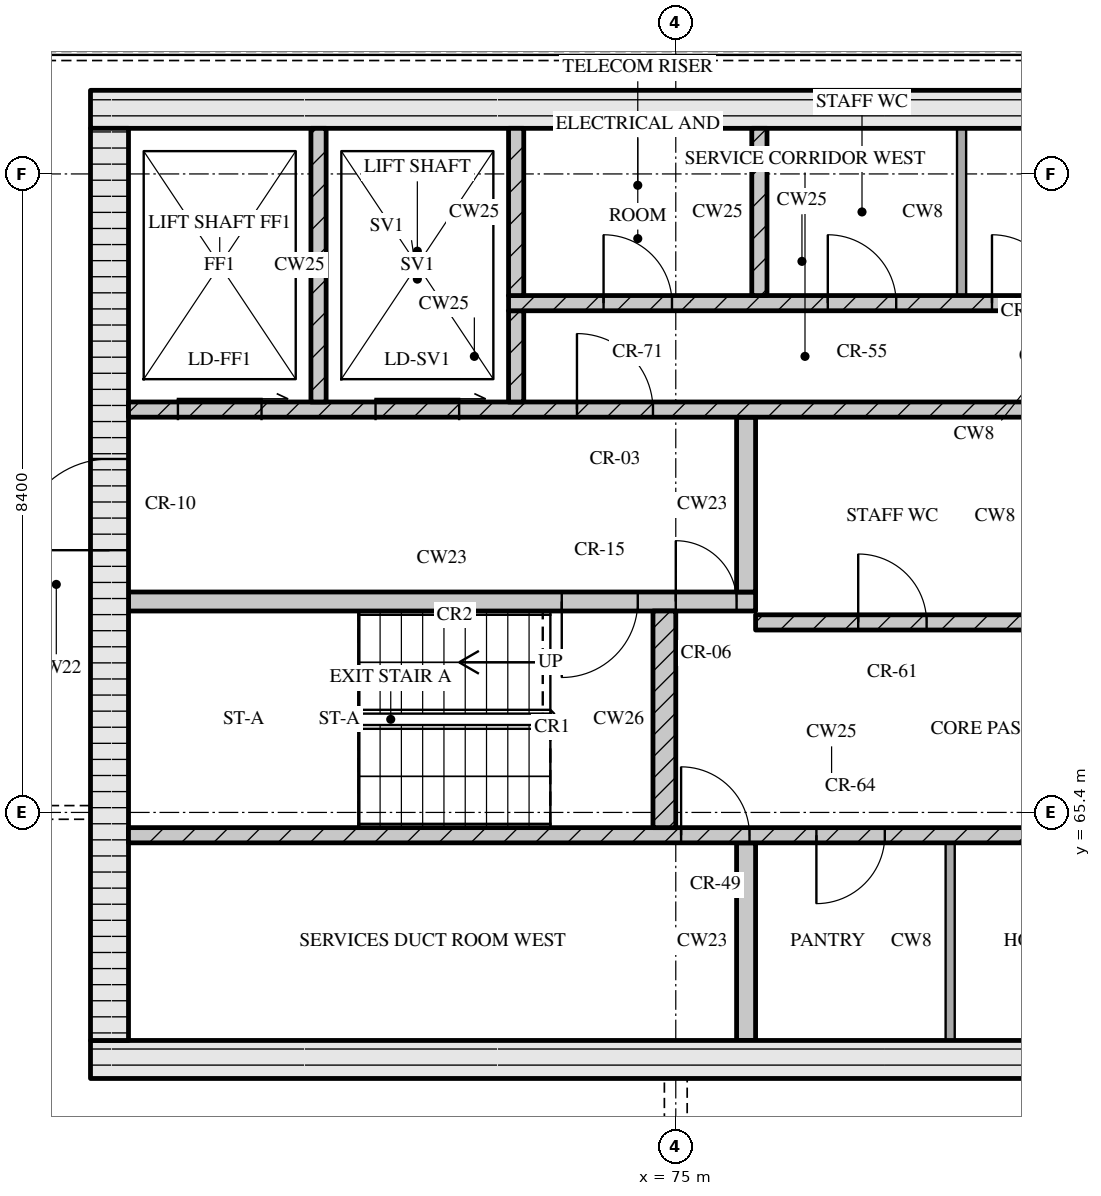
"""IFC4 building model, lengths in metres.
Left out: names, types, materials, properties, quantities, classifications, styles, units other than length and angle.
Written with IfcOpenShell. Run it as: python <this file> out.ifc"""

import sys

from ifc_helpers import new_model, si_unit, direction, frame, frame_2d, origin, place, context, subcontext, project, spatial, rectangle, extrude, element, fill, save


model = new_model("IFC4")
c1 = context("Model", 3, precision=1e-05, world=origin(), true_north=direction((0.0, 1.0)))
c2 = subcontext(c1, "Body", "Model", "MODEL_VIEW")
j1 = project(units=[si_unit("LENGTHUNIT", "METRE"), si_unit("PLANEANGLEUNIT", "RADIAN")], contexts=[c1])
p1 = place(None, origin())
s1 = spatial("IfcSite", under=j1, at=p1, CompositionType="ELEMENT")
p2 = place(p1, origin())
s2 = spatial("IfcBuilding", under=s1, at=p2, CompositionType="ELEMENT")
p3 = place(p2, frame((0.0, 0.0, 277.95)))
s3 = spatial("IfcBuildingStorey", under=s2, at=p3, CompositionType="ELEMENT", Elevation=277.95)
p4 = place(p3, frame((67.3, 62.15, 0.0), z_axis=(0.0, 0.0, 1.0), x_axis=(1.0, 0.0, 0.0)))
e1 = element("IfcWall", 1, at=p4, inside=s3, PredefinedType="SOLIDWALL", context=c2, shape_type="SweptSolid", body=[
    extrude(rectangle(XDim=40.6, YDim=0.5, at=frame_2d((20.3, 0.0))), origin(), (0.0, 0.0, 1.0), 3.32),
])
p5 = place(p4, frame((20.65, 0.0, 0.0)))
e2 = element("IfcOpeningElement", 2, at=p5, cuts=e1, PredefinedType="OPENING", context=c2, shape_type="SweptSolid", body=[
    extrude(rectangle(XDim=1.8, YDim=2.1, at=frame_2d((0.9, 1.05))), frame((0.0, 0.26, 0.0), z_axis=(0.0, -1.0, 0.0), x_axis=(1.0, 0.0, 0.0)), (0.0, 0.0, 1.0), 0.52),
])
p6 = place(p3, frame((67.3, 74.65, 0.0), z_axis=(0.0, 0.0, 1.0), x_axis=(1.0, 0.0, 0.0)))
e3 = element("IfcWall", 3, at=p6, inside=s3, PredefinedType="SOLIDWALL", context=c2, shape_type="SweptSolid", body=[
    extrude(rectangle(XDim=40.6, YDim=0.5, at=frame_2d((20.3, 0.0))), origin(), (0.0, 0.0, 1.0), 3.32),
])
p7 = place(p3, frame((67.55, 62.4, 0.0), z_axis=(0.0, 0.0, 1.0), x_axis=(0.0, 1.0, 0.0)))
e4 = element("IfcWall", 4, at=p7, inside=s3, PredefinedType="SOLIDWALL", context=c2, shape_type="SweptSolid", body=[
    extrude(rectangle(XDim=12.0, YDim=0.5, at=frame_2d((6.0, 0.0))), origin(), (0.0, 0.0, 1.0), 3.32),
])
p8 = place(p7, frame((6.45, 0.0, 0.0)))
e5 = element("IfcOpeningElement", 5, at=p8, cuts=e4, PredefinedType="OPENING", context=c2, shape_type="SweptSolid", body=[
    extrude(rectangle(XDim=1.2, YDim=2.1, at=frame_2d((0.6, 1.05))), frame((0.0, 0.26, 0.0), z_axis=(0.0, -1.0, 0.0), x_axis=(1.0, 0.0, 0.0)), (0.0, 0.0, 1.0), 0.52),
])
p9 = place(p3, frame((75.925, 62.4, 0.0), z_axis=(0.0, 0.0, 1.0), x_axis=(0.0, 1.0, 0.0)))
e6 = element("IfcWall", 6, at=p9, inside=s3, PredefinedType="SOLIDWALL", context=c2, shape_type="SweptSolid", body=[
    extrude(rectangle(XDim=2.6, YDim=0.25, at=frame_2d((1.3, 0.0))), origin(), (0.0, 0.0, 1.0), 3.32),
])
p10 = place(p3, frame((78.61, 62.4, 0.0), z_axis=(0.0, 0.0, 1.0), x_axis=(0.0, 1.0, 0.0)))
e7 = element("IfcWall", 7, at=p10, inside=s3, PredefinedType="PARTITIONING", context=c2, shape_type="SweptSolid", body=[
    extrude(rectangle(XDim=2.6, YDim=0.12, at=frame_2d((1.3, 0.0))), origin(), (0.0, 0.0, 1.0), 3.32),
])
p11 = place(p3, frame((67.8, 65.1, 0.0), z_axis=(0.0, 0.0, 1.0), x_axis=(1.0, 0.0, 0.0)))
e8 = element("IfcWall", 8, at=p11, inside=s3, PredefinedType="SOLIDWALL", context=c2, shape_type="SweptSolid", body=[
    extrude(rectangle(XDim=18.5, YDim=0.2, at=frame_2d((9.25, 0.0))), origin(), (0.0, 0.0, 1.0), 3.32),
])
p12 = place(p11, frame((7.27, 0.0, 0.0)))
e9 = element("IfcOpeningElement", 9, at=p12, cuts=e8, PredefinedType="OPENING", context=c2, shape_type="SweptSolid", body=[
    extrude(rectangle(XDim=0.9, YDim=2.1, at=frame_2d((0.45, 1.05))), frame((0.0, 0.11, 0.0), z_axis=(0.0, -1.0, 0.0), x_axis=(1.0, 0.0, 0.0)), (0.0, 0.0, 1.0), 0.22),
])
p13 = place(p11, frame((9.05, 0.0, 0.0)))
e10 = element("IfcOpeningElement", 10, at=p13, cuts=e8, PredefinedType="OPENING", context=c2, shape_type="SweptSolid", body=[
    extrude(rectangle(XDim=0.9, YDim=2.1, at=frame_2d((0.45, 1.05))), frame((0.0, 0.11, 0.0), z_axis=(0.0, -1.0, 0.0), x_axis=(1.0, 0.0, 0.0)), (0.0, 0.0, 1.0), 0.22),
])
p14 = place(p11, frame((12.76, 0.0, 0.0)))
e11 = element("IfcOpeningElement", 11, at=p14, cuts=e8, PredefinedType="OPENING", context=c2, shape_type="SweptSolid", body=[
    extrude(rectangle(XDim=0.9, YDim=2.1, at=frame_2d((0.45, 1.05))), frame((0.0, 0.11, 0.0), z_axis=(0.0, -1.0, 0.0), x_axis=(1.0, 0.0, 0.0)), (0.0, 0.0, 1.0), 0.22),
])
p15 = place(p11, frame((16.7, 0.0, 0.0)))
e12 = element("IfcOpeningElement", 12, at=p15, cuts=e8, PredefinedType="OPENING", context=c2, shape_type="SweptSolid", body=[
    extrude(rectangle(XDim=0.9, YDim=2.1, at=frame_2d((0.45, 1.05))), frame((0.0, 0.11, 0.0), z_axis=(0.0, -1.0, 0.0), x_axis=(1.0, 0.0, 0.0)), (0.0, 0.0, 1.0), 0.22),
])
p16 = place(p3, frame((74.85, 65.2, 0.0), z_axis=(0.0, 0.0, 1.0), x_axis=(0.0, 1.0, 0.0)))
e13 = element("IfcWall", 13, at=p16, inside=s3, PredefinedType="SOLIDWALL", context=c2, shape_type="SweptSolid", body=[
    extrude(rectangle(XDim=2.85, YDim=0.3, at=frame_2d((1.425, 0.0))), origin(), (0.0, 0.0, 1.0), 3.32),
])
p17 = place(p3, frame((76.05, 67.9, 0.0), z_axis=(0.0, 0.0, 1.0), x_axis=(1.0, 0.0, 0.0)))
e14 = element("IfcWall", 14, at=p17, inside=s3, PredefinedType="SOLIDWALL", context=c2, shape_type="SweptSolid", body=[
    extrude(rectangle(XDim=23.1, YDim=0.2, at=frame_2d((11.55, 0.0))), origin(), (0.0, 0.0, 1.0), 3.32),
])
p18 = place(p17, frame((1.35, 0.0, 0.0)))
e15 = element("IfcOpeningElement", 15, at=p18, cuts=e14, PredefinedType="OPENING", context=c2, shape_type="SweptSolid", body=[
    extrude(rectangle(XDim=0.9, YDim=2.1, at=frame_2d((0.45, 1.05))), frame((0.0, 0.11, 0.0), z_axis=(0.0, -1.0, 0.0), x_axis=(1.0, 0.0, 0.0)), (0.0, 0.0, 1.0), 0.22),
])
p19 = place(p17, frame((5.06, 0.0, 0.0)))
e16 = element("IfcOpeningElement", 16, at=p19, cuts=e14, PredefinedType="OPENING", context=c2, shape_type="SweptSolid", body=[
    extrude(rectangle(XDim=0.9, YDim=2.1, at=frame_2d((0.45, 1.05))), frame((0.0, 0.11, 0.0), z_axis=(0.0, -1.0, 0.0), x_axis=(1.0, 0.0, 0.0)), (0.0, 0.0, 1.0), 0.22),
])
p20 = place(p17, frame((8.45, 0.0, 0.0)))
e17 = element("IfcOpeningElement", 17, at=p20, cuts=e14, PredefinedType="OPENING", context=c2, shape_type="SweptSolid", body=[
    extrude(rectangle(XDim=0.9, YDim=2.1, at=frame_2d((0.45, 1.05))), frame((0.0, 0.11, 0.0), z_axis=(0.0, -1.0, 0.0), x_axis=(1.0, 0.0, 0.0)), (0.0, 0.0, 1.0), 0.22),
])
p21 = place(p17, frame((10.91, 0.0, 0.0)))
e18 = element("IfcOpeningElement", 18, at=p21, cuts=e14, PredefinedType="OPENING", context=c2, shape_type="SweptSolid", body=[
    extrude(rectangle(XDim=0.9, YDim=2.1, at=frame_2d((0.45, 1.05))), frame((0.0, 0.11, 0.0), z_axis=(0.0, -1.0, 0.0), x_axis=(1.0, 0.0, 0.0)), (0.0, 0.0, 1.0), 0.22),
])
p22 = place(p17, frame((13.55, 0.0, 0.0)))
e19 = element("IfcOpeningElement", 19, at=p22, cuts=e14, PredefinedType="OPENING", context=c2, shape_type="SweptSolid", body=[
    extrude(rectangle(XDim=1.0, YDim=2.1, at=frame_2d((0.5, 1.05))), frame((0.0, 0.11, 0.0), z_axis=(0.0, -1.0, 0.0), x_axis=(1.0, 0.0, 0.0)), (0.0, 0.0, 1.0), 0.22),
])
p23 = place(p17, frame((16.2, 0.0, 0.0)))
e20 = element("IfcOpeningElement", 20, at=p23, cuts=e14, PredefinedType="OPENING", context=c2, shape_type="SweptSolid", body=[
    extrude(rectangle(XDim=1.1, YDim=2.1, at=frame_2d((0.55, 1.05))), frame((0.0, 0.11, 0.0), z_axis=(0.0, -1.0, 0.0), x_axis=(1.0, 0.0, 0.0)), (0.0, 0.0, 1.0), 0.22),
])
p24 = place(p17, frame((18.7, 0.0, 0.0)))
e21 = element("IfcOpeningElement", 21, at=p24, cuts=e14, PredefinedType="OPENING", context=c2, shape_type="SweptSolid", body=[
    extrude(rectangle(XDim=1.1, YDim=2.1, at=frame_2d((0.55, 1.05))), frame((0.0, 0.11, 0.0), z_axis=(0.0, -1.0, 0.0), x_axis=(1.0, 0.0, 0.0)), (0.0, 0.0, 1.0), 0.22),
])
p25 = place(p17, frame((21.2, 0.0, 0.0)))
e22 = element("IfcOpeningElement", 22, at=p25, cuts=e14, PredefinedType="OPENING", context=c2, shape_type="SweptSolid", body=[
    extrude(rectangle(XDim=1.1, YDim=2.1, at=frame_2d((0.55, 1.05))), frame((0.0, 0.11, 0.0), z_axis=(0.0, -1.0, 0.0), x_axis=(1.0, 0.0, 0.0)), (0.0, 0.0, 1.0), 0.22),
])
p26 = place(p3, frame((67.8, 68.175, 0.0), z_axis=(0.0, 0.0, 1.0), x_axis=(1.0, 0.0, 0.0)))
e23 = element("IfcWall", 23, at=p26, inside=s3, PredefinedType="SOLIDWALL", context=c2, shape_type="SweptSolid", body=[
    extrude(rectangle(XDim=8.25, YDim=0.25, at=frame_2d((4.125, 0.0))), origin(), (0.0, 0.0, 1.0), 3.32),
])
p27 = place(p26, frame((5.7, 0.0, 0.0)))
e24 = element("IfcOpeningElement", 24, at=p27, cuts=e23, PredefinedType="OPENING", context=c2, shape_type="SweptSolid", body=[
    extrude(rectangle(XDim=1.0, YDim=2.1, at=frame_2d((0.5, 1.05))), frame((0.0, 0.135, 0.0), z_axis=(0.0, -1.0, 0.0), x_axis=(1.0, 0.0, 0.0)), (0.0, 0.0, 1.0), 0.27),
])
p28 = place(p26, frame((7.2, 0.0, 0.0)))
e25 = element("IfcOpeningElement", 25, at=p28, cuts=e23, PredefinedType="OPENING", context=c2, shape_type="SweptSolid", body=[
    extrude(rectangle(XDim=0.8, YDim=2.1, at=frame_2d((0.4, 1.05))), frame((0.0, 0.135, 0.0), z_axis=(0.0, -1.0, 0.0), x_axis=(1.0, 0.0, 0.0)), (0.0, 0.0, 1.0), 0.27),
])
p29 = place(p3, frame((75.925, 68.3, 0.0), z_axis=(0.0, 0.0, 1.0), x_axis=(0.0, 1.0, 0.0)))
e26 = element("IfcWall", 26, at=p29, inside=s3, PredefinedType="SOLIDWALL", context=c2, shape_type="SweptSolid", body=[
    extrude(rectangle(XDim=2.3, YDim=0.25, at=frame_2d((1.15, 0.0))), origin(), (0.0, 0.0, 1.0), 3.32),
])
p30 = place(p3, frame((67.8, 70.7, 0.0), z_axis=(0.0, 0.0, 1.0), x_axis=(1.0, 0.0, 0.0)))
e27 = element("IfcWall", 27, at=p30, inside=s3, PredefinedType="SOLIDWALL", context=c2, shape_type="SweptSolid", body=[
    extrude(rectangle(XDim=39.6, YDim=0.2, at=frame_2d((19.8, 0.0))), origin(), (0.0, 0.0, 1.0), 3.32),
])
p31 = place(p30, frame((0.65, 0.0, 0.0)))
e28 = element("IfcOpeningElement", 28, at=p31, cuts=e27, PredefinedType="OPENING", context=c2, shape_type="SweptSolid", body=[
    extrude(rectangle(XDim=1.1, YDim=2.1, at=frame_2d((0.55, 1.05))), frame((0.0, 0.11, 0.0), z_axis=(0.0, -1.0, 0.0), x_axis=(1.0, 0.0, 0.0)), (0.0, 0.0, 1.0), 0.22),
])
p32 = place(p30, frame((3.25, 0.0, 0.0)))
e29 = element("IfcOpeningElement", 29, at=p32, cuts=e27, PredefinedType="OPENING", context=c2, shape_type="SweptSolid", body=[
    extrude(rectangle(XDim=1.1, YDim=2.1, at=frame_2d((0.55, 1.05))), frame((0.0, 0.11, 0.0), z_axis=(0.0, -1.0, 0.0), x_axis=(1.0, 0.0, 0.0)), (0.0, 0.0, 1.0), 0.22),
])
p33 = place(p30, frame((5.9, 0.0, 0.0)))
e30 = element("IfcOpeningElement", 30, at=p33, cuts=e27, PredefinedType="OPENING", context=c2, shape_type="SweptSolid", body=[
    extrude(rectangle(XDim=1.0, YDim=2.1, at=frame_2d((0.5, 1.05))), frame((0.0, 0.11, 0.0), z_axis=(0.0, -1.0, 0.0), x_axis=(1.0, 0.0, 0.0)), (0.0, 0.0, 1.0), 0.22),
])
p34 = place(p30, frame((21.7, 0.0, 0.0)))
e31 = element("IfcOpeningElement", 31, at=p34, cuts=e27, PredefinedType="OPENING", context=c2, shape_type="SweptSolid", body=[
    extrude(rectangle(XDim=1.0, YDim=2.1, at=frame_2d((0.5, 1.05))), frame((0.0, 0.11, 0.0), z_axis=(0.0, -1.0, 0.0), x_axis=(1.0, 0.0, 0.0)), (0.0, 0.0, 1.0), 0.22),
])
p35 = place(p30, frame((32.7, 0.0, 0.0)))
e32 = element("IfcOpeningElement", 32, at=p35, cuts=e27, PredefinedType="OPENING", context=c2, shape_type="SweptSolid", body=[
    extrude(rectangle(XDim=1.0, YDim=2.1, at=frame_2d((0.5, 1.05))), frame((0.0, 0.11, 0.0), z_axis=(0.0, -1.0, 0.0), x_axis=(1.0, 0.0, 0.0)), (0.0, 0.0, 1.0), 0.22),
])
p36 = place(p30, frame((35.25, 0.0, 0.0)))
e33 = element("IfcOpeningElement", 33, at=p36, cuts=e27, PredefinedType="OPENING", context=c2, shape_type="SweptSolid", body=[
    extrude(rectangle(XDim=1.1, YDim=2.1, at=frame_2d((0.55, 1.05))), frame((0.0, 0.11, 0.0), z_axis=(0.0, -1.0, 0.0), x_axis=(1.0, 0.0, 0.0)), (0.0, 0.0, 1.0), 0.22),
])
p37 = place(p30, frame((37.85, 0.0, 0.0)))
e34 = element("IfcOpeningElement", 34, at=p37, cuts=e27, PredefinedType="OPENING", context=c2, shape_type="SweptSolid", body=[
    extrude(rectangle(XDim=1.1, YDim=2.1, at=frame_2d((0.55, 1.05))), frame((0.0, 0.11, 0.0), z_axis=(0.0, -1.0, 0.0), x_axis=(1.0, 0.0, 0.0)), (0.0, 0.0, 1.0), 0.22),
])
p38 = place(p3, frame((70.3, 70.8, 0.0), z_axis=(0.0, 0.0, 1.0), x_axis=(0.0, 1.0, 0.0)))
e35 = element("IfcWall", 35, at=p38, inside=s3, PredefinedType="SOLIDWALL", context=c2, shape_type="SweptSolid", body=[
    extrude(rectangle(XDim=3.6, YDim=0.2, at=frame_2d((1.8, 0.0))), origin(), (0.0, 0.0, 1.0), 3.32),
])
p39 = place(p3, frame((72.9, 70.8, 0.0), z_axis=(0.0, 0.0, 1.0), x_axis=(0.0, 1.0, 0.0)))
e36 = element("IfcWall", 36, at=p39, inside=s3, PredefinedType="SOLIDWALL", context=c2, shape_type="SweptSolid", body=[
    extrude(rectangle(XDim=1.2, YDim=0.2, at=frame_2d((0.6, 0.0))), origin(), (0.0, 0.0, 1.0), 3.32),
])
p40 = place(p3, frame((72.8, 72.1, 0.0), z_axis=(0.0, 0.0, 1.0), x_axis=(1.0, 0.0, 0.0)))
e37 = element("IfcWall", 37, at=p40, inside=s3, PredefinedType="SOLIDWALL", context=c2, shape_type="SweptSolid", body=[
    extrude(rectangle(XDim=7.72, YDim=0.2, at=frame_2d((3.86, 0.0))), origin(), (0.0, 0.0, 1.0), 3.32),
])
p41 = place(p40, frame((1.25, 0.0, 0.0)))
e38 = element("IfcOpeningElement", 38, at=p41, cuts=e37, PredefinedType="OPENING", context=c2, shape_type="SweptSolid", body=[
    extrude(rectangle(XDim=0.9, YDim=2.1, at=frame_2d((0.45, 1.05))), frame((0.0, 0.11, 0.0), z_axis=(0.0, -1.0, 0.0), x_axis=(1.0, 0.0, 0.0)), (0.0, 0.0, 1.0), 0.22),
])
p42 = place(p40, frame((4.2, 0.0, 0.0)))
e39 = element("IfcOpeningElement", 39, at=p42, cuts=e37, PredefinedType="OPENING", context=c2, shape_type="SweptSolid", body=[
    extrude(rectangle(XDim=0.9, YDim=2.1, at=frame_2d((0.45, 1.05))), frame((0.0, 0.11, 0.0), z_axis=(0.0, -1.0, 0.0), x_axis=(1.0, 0.0, 0.0)), (0.0, 0.0, 1.0), 0.22),
])
p43 = place(p40, frame((6.36, 0.0, 0.0)))
e40 = element("IfcOpeningElement", 40, at=p43, cuts=e37, PredefinedType="OPENING", context=c2, shape_type="SweptSolid", body=[
    extrude(rectangle(XDim=0.9, YDim=2.1, at=frame_2d((0.45, 1.05))), frame((0.0, 0.11, 0.0), z_axis=(0.0, -1.0, 0.0), x_axis=(1.0, 0.0, 0.0)), (0.0, 0.0, 1.0), 0.22),
])
for number, where, z_axis, x_axis in (
    (41, (72.9, 72.2, 0.0), (0.0, 0.0, 1.0), (0.0, 1.0, 0.0)),
    (42, (76.1, 72.2, 0.0), (0.0, 0.0, 1.0), (0.0, 1.0, 0.0)),
):
    element("IfcWall", number, at=place(p3, frame(where, z_axis=z_axis, x_axis=x_axis)), inside=s3, PredefinedType="SOLIDWALL", context=c2, shape_type="SweptSolid", body=[
        extrude(rectangle(XDim=2.2, YDim=0.2, at=frame_2d((1.1, 0.0))), origin(), (0.0, 0.0, 1.0), 3.32),
    ])
p44 = place(p3, frame((78.76, 72.2, 0.0), z_axis=(0.0, 0.0, 1.0), x_axis=(0.0, 1.0, 0.0)))
e43 = element("IfcWall", 43, at=p44, inside=s3, PredefinedType="PARTITIONING", context=c2, shape_type="SweptSolid", body=[
    extrude(rectangle(XDim=2.2, YDim=0.12, at=frame_2d((1.1, 0.0))), origin(), (0.0, 0.0, 1.0), 3.32),
])
p45 = place(p12, origin())
e44 = element("IfcDoor", 44, at=p45, inside=s3, OperationType="SINGLE_SWING_LEFT", PredefinedType="DOOR", context=c2, shape_type="SweptSolid", body=[
    extrude(rectangle(XDim=0.9, YDim=2.1, at=frame_2d((0.45, 1.05))), frame((0.0, 0.025, 0.0), z_axis=(0.0, -1.0, 0.0), x_axis=(1.0, 0.0, 0.0)), (0.0, 0.0, 1.0), 0.05),
])
fill(e9, e44)
p46 = place(p13, origin())
e45 = element("IfcDoor", 45, at=p46, inside=s3, OperationType="SINGLE_SWING_RIGHT", PredefinedType="DOOR", context=c2, shape_type="SweptSolid", body=[
    extrude(rectangle(XDim=0.9, YDim=2.1, at=frame_2d((0.45, 1.05))), frame((0.0, 0.025, 0.0), z_axis=(0.0, -1.0, 0.0), x_axis=(1.0, 0.0, 0.0)), (0.0, 0.0, 1.0), 0.05),
])
fill(e10, e45)
p47 = place(p18, origin())
e46 = element("IfcDoor", 46, at=p47, inside=s3, OperationType="SINGLE_SWING_LEFT", PredefinedType="DOOR", context=c2, shape_type="SweptSolid", body=[
    extrude(rectangle(XDim=0.9, YDim=2.1, at=frame_2d((0.45, 1.05))), frame((0.0, 0.025, 0.0), z_axis=(0.0, -1.0, 0.0), x_axis=(1.0, 0.0, 0.0)), (0.0, 0.0, 1.0), 0.05),
])
fill(e15, e46)
p48 = place(p27, origin())
e47 = element("IfcDoor", 47, at=p48, inside=s3, OperationType="SINGLE_SWING_RIGHT", PredefinedType="DOOR", context=c2, shape_type="SweptSolid", body=[
    extrude(rectangle(XDim=1.0, YDim=2.1, at=frame_2d((0.5, 1.05))), frame((0.0, 0.025, 0.0), z_axis=(0.0, -1.0, 0.0), x_axis=(1.0, 0.0, 0.0)), (0.0, 0.0, 1.0), 0.05),
])
fill(e24, e47)
p49 = place(p28, origin())
e48 = element("IfcDoor", 48, at=p49, inside=s3, OperationType="SINGLE_SWING_LEFT", PredefinedType="DOOR", context=c2, shape_type="SweptSolid", body=[
    extrude(rectangle(XDim=0.8, YDim=2.1, at=frame_2d((0.4, 1.05))), frame((0.0, 0.025, 0.0), z_axis=(0.0, -1.0, 0.0), x_axis=(1.0, 0.0, 0.0)), (0.0, 0.0, 1.0), 0.05),
])
fill(e25, e48)
p50 = place(p8, origin())
e49 = element("IfcDoor", 49, at=p50, inside=s3, OperationType="SINGLE_SWING_LEFT", PredefinedType="DOOR", context=c2, shape_type="SweptSolid", body=[
    extrude(rectangle(XDim=1.2, YDim=2.1, at=frame_2d((0.6, 1.05))), frame((0.0, 0.025, 0.0), z_axis=(0.0, -1.0, 0.0), x_axis=(1.0, 0.0, 0.0)), (0.0, 0.0, 1.0), 0.05),
])
fill(e5, e49)
p51 = place(p31, origin())
e50 = element("IfcDoor", 50, at=p51, inside=s3, OperationType="SLIDING_TO_RIGHT", PredefinedType="DOOR", context=c2, shape_type="SweptSolid", body=[
    extrude(rectangle(XDim=1.1, YDim=2.1, at=frame_2d((0.55, 1.05))), frame((0.0, 0.025, 0.0), z_axis=(0.0, -1.0, 0.0), x_axis=(1.0, 0.0, 0.0)), (0.0, 0.0, 1.0), 0.05),
])
fill(e28, e50)
p52 = place(p32, origin())
e51 = element("IfcDoor", 51, at=p52, inside=s3, OperationType="SLIDING_TO_RIGHT", PredefinedType="DOOR", context=c2, shape_type="SweptSolid", body=[
    extrude(rectangle(XDim=1.1, YDim=2.1, at=frame_2d((0.55, 1.05))), frame((0.0, 0.025, 0.0), z_axis=(0.0, -1.0, 0.0), x_axis=(1.0, 0.0, 0.0)), (0.0, 0.0, 1.0), 0.05),
])
fill(e29, e51)
p53 = place(p33, origin())
e52 = element("IfcDoor", 52, at=p53, inside=s3, OperationType="SINGLE_SWING_LEFT", PredefinedType="DOOR", context=c2, shape_type="SweptSolid", body=[
    extrude(rectangle(XDim=1.0, YDim=2.1, at=frame_2d((0.5, 1.05))), frame((0.0, 0.025, 0.0), z_axis=(0.0, -1.0, 0.0), x_axis=(1.0, 0.0, 0.0)), (0.0, 0.0, 1.0), 0.05),
])
fill(e30, e52)
p54 = place(p41, origin())
e53 = element("IfcDoor", 53, at=p54, inside=s3, OperationType="SINGLE_SWING_LEFT", PredefinedType="DOOR", context=c2, shape_type="SweptSolid", body=[
    extrude(rectangle(XDim=0.9, YDim=2.1, at=frame_2d((0.45, 1.05))), frame((0.0, 0.025, 0.0), z_axis=(0.0, -1.0, 0.0), x_axis=(1.0, 0.0, 0.0)), (0.0, 0.0, 1.0), 0.05),
])
fill(e38, e53)
p55 = place(p42, origin())
e54 = element("IfcDoor", 54, at=p55, inside=s3, OperationType="SINGLE_SWING_LEFT", PredefinedType="DOOR", context=c2, shape_type="SweptSolid", body=[
    extrude(rectangle(XDim=0.9, YDim=2.1, at=frame_2d((0.45, 1.05))), frame((0.0, 0.025, 0.0), z_axis=(0.0, -1.0, 0.0), x_axis=(1.0, 0.0, 0.0)), (0.0, 0.0, 1.0), 0.05),
])
fill(e39, e54)
p56 = place(p43, origin())
e55 = element("IfcDoor", 55, at=p56, inside=s3, OperationType="SINGLE_SWING_LEFT", PredefinedType="DOOR", context=c2, shape_type="SweptSolid", body=[
    extrude(rectangle(XDim=0.9, YDim=2.1, at=frame_2d((0.45, 1.05))), frame((0.0, 0.025, 0.0), z_axis=(0.0, -1.0, 0.0), x_axis=(1.0, 0.0, 0.0)), (0.0, 0.0, 1.0), 0.05),
])
fill(e40, e55)
save(model, sys.argv[1])
